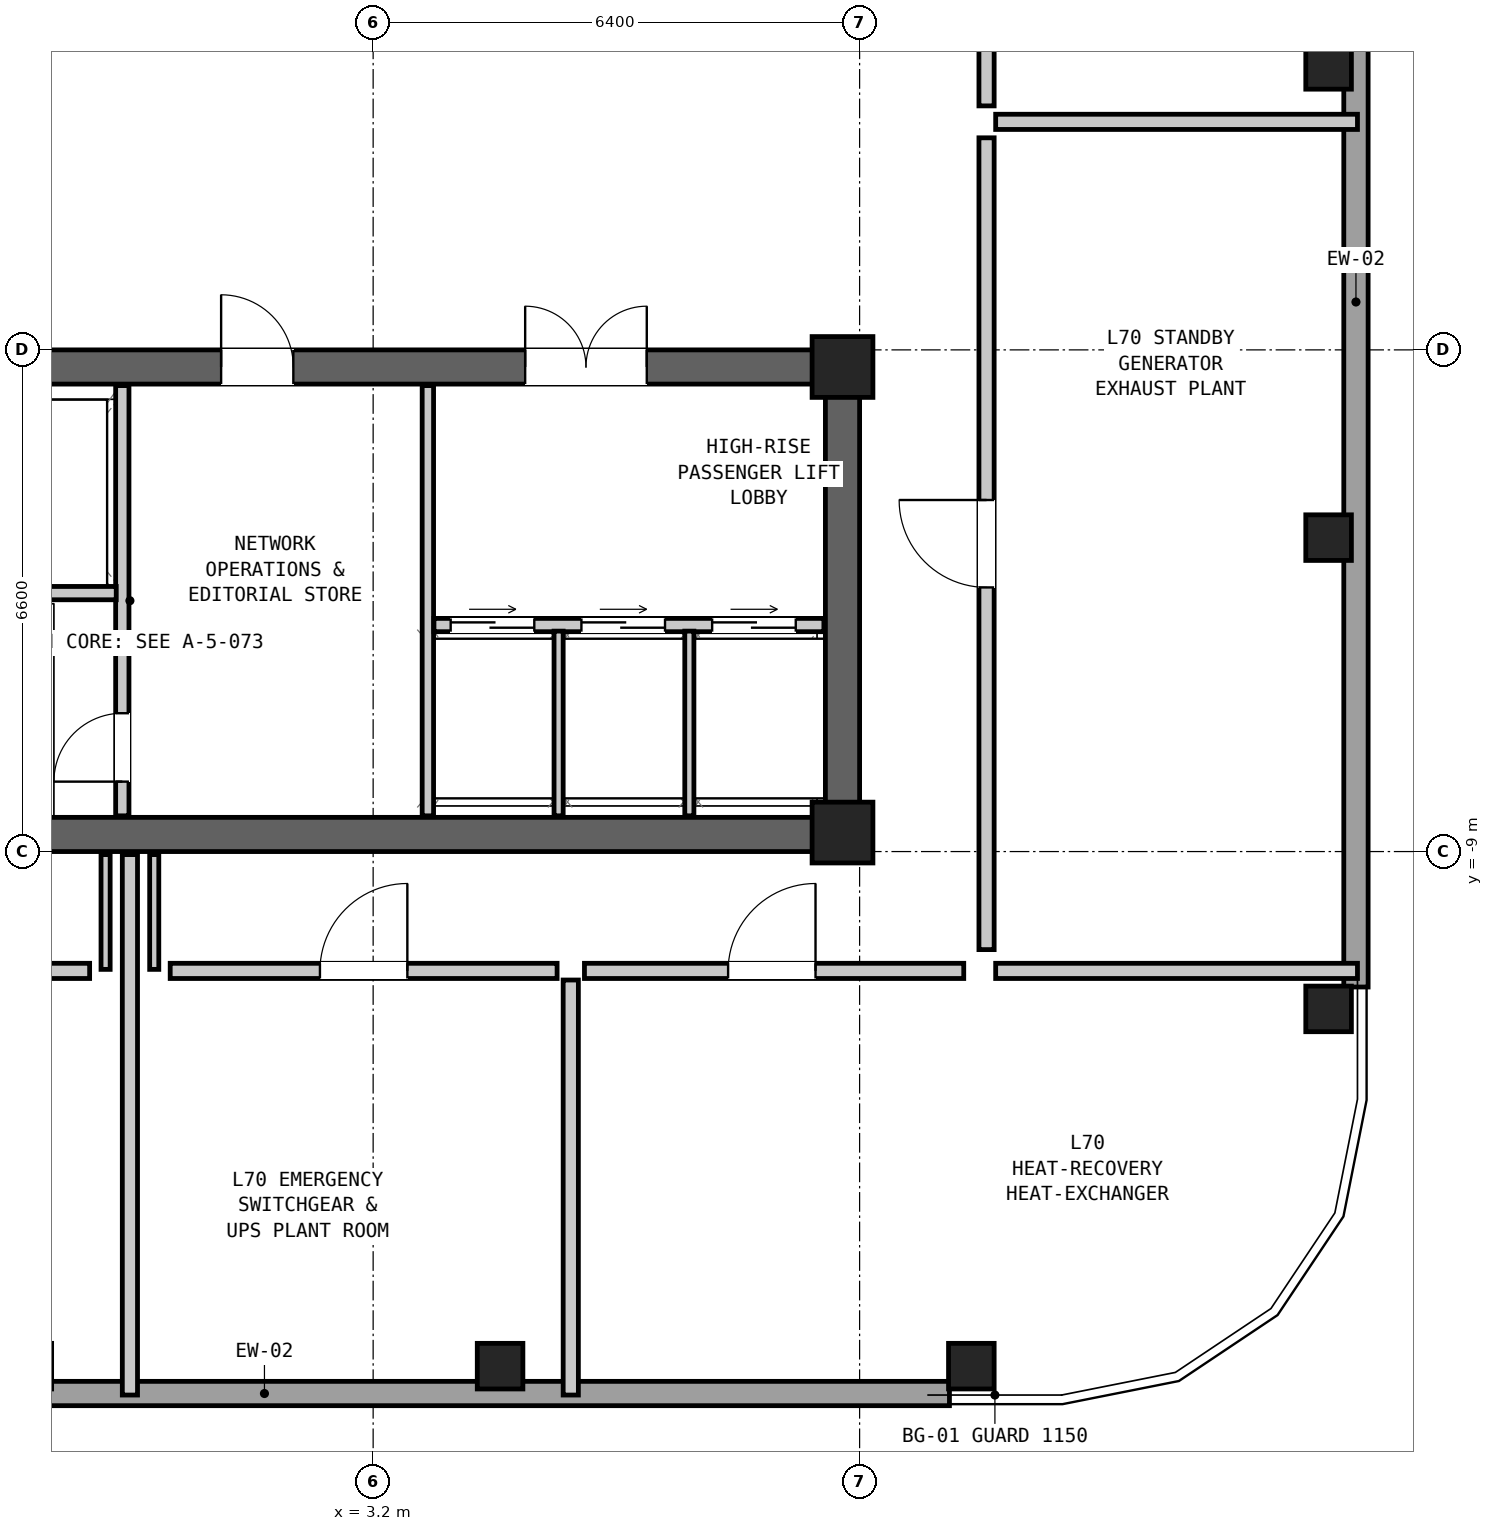
"""IFC4 building model, lengths in metres.
Left out: names, types, materials, properties, quantities, classifications, styles, units other than length and angle.
Written with IfcOpenShell. Run it as: python <this file> out.ifc"""

import sys

from ifc_helpers import new_model, si_unit, direction, frame, frame_2d, origin, origin_2d, place, context, subcontext, project, spatial, rectangle, hollow_rectangle, extrude, element, fill, save


model = new_model("IFC4")
c1 = context("Model", 3, precision=1e-05, world=origin(), true_north=direction((0.0, 1.0)))
c2 = subcontext(c1, "Body", "Model", "MODEL_VIEW")
j1 = project(units=[si_unit("LENGTHUNIT", "METRE"), si_unit("PLANEANGLEUNIT", "RADIAN")], contexts=[c1])
p1 = place(None, origin())
s1 = spatial("IfcSite", under=j1, at=p1, CompositionType="ELEMENT")
p2 = place(p1, origin())
s2 = spatial("IfcBuilding", under=s1, at=p2, CompositionType="ELEMENT")
p3 = place(p2, frame((0.0, 0.0, 238.5)))
s3 = spatial("IfcBuildingStorey", under=s2, at=p3, CompositionType="ELEMENT", Elevation=238.5)
p4 = place(p3, frame((-9.6, -8.775, 0.0), z_axis=(0.0, 0.0, 1.0), x_axis=(1.0, 0.0, 0.0)))
e1 = element("IfcWall", 1, at=p4, inside=s3, PredefinedType="SHEAR", context=c2, shape_type="SweptSolid", body=[
    extrude(rectangle(XDim=19.2, YDim=0.45, at=frame_2d((9.6, 0.0))), origin(), (0.0, 0.0, 1.0), 4.35),
])
p5 = place(p3, frame((-9.6, -2.625, 0.0), z_axis=(0.0, 0.0, 1.0), x_axis=(1.0, 0.0, 0.0)))
e2 = element("IfcWall", 2, at=p5, inside=s3, PredefinedType="SHEAR", context=c2, shape_type="SweptSolid", body=[
    extrude(rectangle(XDim=19.2, YDim=0.45, at=frame_2d((9.6, 0.0))), origin(), (0.0, 0.0, 1.0), 4.35),
])
p6 = place(p5, frame((3.8, 0.0, 0.0)))
e3 = element("IfcOpeningElement", 3, at=p6, cuts=e2, PredefinedType="OPENING", context=c2, shape_type="SweptSolid", body=[
    extrude(rectangle(XDim=1.1, YDim=2.08, at=frame_2d((0.55, 1.04))), frame((0.0, 0.237, 0.0), z_axis=(0.0, -1.0, 0.0), x_axis=(1.0, 0.0, 0.0)), (0.0, 0.0, 1.0), 0.474),
])
p7 = place(p5, frame((10.8, 0.0, 0.0)))
e4 = element("IfcOpeningElement", 4, at=p7, cuts=e2, PredefinedType="OPENING", context=c2, shape_type="SweptSolid", body=[
    extrude(rectangle(XDim=0.95, YDim=2.1, at=frame_2d((0.475, 1.05))), frame((0.0, 0.237, 0.0), z_axis=(0.0, -1.0, 0.0), x_axis=(1.0, 0.0, 0.0)), (0.0, 0.0, 1.0), 0.474),
])
p8 = place(p5, frame((14.8, 0.0, 0.0)))
e5 = element("IfcOpeningElement", 5, at=p8, cuts=e2, PredefinedType="OPENING", context=c2, shape_type="SweptSolid", body=[
    extrude(rectangle(XDim=1.6, YDim=2.12, at=frame_2d((0.8, 1.06))), frame((0.0, 0.237, 0.0), z_axis=(0.0, -1.0, 0.0), x_axis=(1.0, 0.0, 0.0)), (0.0, 0.0, 1.0), 0.474),
])
p9 = place(p3, frame((9.375, -9.0, 0.0), z_axis=(0.0, 0.0, 1.0), x_axis=(0.0, 1.0, 0.0)))
e6 = element("IfcWall", 6, at=p9, inside=s3, PredefinedType="SHEAR", context=c2, shape_type="SweptSolid", body=[
    extrude(rectangle(XDim=6.6, YDim=0.45, at=frame_2d((3.3, 0.0))), origin(), (0.0, 0.0, 1.0), 4.35),
])
for number, where, z_axis, x_axis in (
    (7, (4.87, -15.77, 0.0), (0.0, 0.0, 1.0), (1.0, 0.0, 0.0)),
    (8, (11.07, -15.77, 0.0), (0.0, 0.0, 1.0), (1.0, 0.0, 0.0)),
    (9, (15.77, -11.07, 0.0), (0.0, 0.0, 1.0), (0.0, 1.0, 0.0)),
    (10, (15.77, -4.87, 0.0), (0.0, 0.0, 1.0), (0.0, 1.0, 0.0)),
    (11, (15.77, 1.33, 0.0), (0.0, 0.0, 1.0), (0.0, 1.0, 0.0)),
):
    element("IfcColumn", number, at=place(p3, frame(where, z_axis=z_axis, x_axis=x_axis)), inside=s3, PredefinedType="COLUMN", context=c2, shape_type="SweptSolid", body=[
        extrude(hollow_rectangle(XDim=0.6, YDim=0.6, WallThickness=0.04, at=origin_2d()), origin(), (0.0, 0.0, 1.0), 4.35),
    ])
for number, where, z_axis, x_axis in (
    (12, (9.375, -2.625, 0.0), (0.0, 0.0, 1.0), (1.0, 0.0, 0.0)),
    (13, (9.375, -8.75, 0.0), (0.0, 0.0, 1.0), (1.0, 0.0, 0.0)),
):
    element("IfcColumn", number, at=place(p3, frame(where, z_axis=z_axis, x_axis=x_axis)), inside=s3, PredefinedType="COLUMN", context=c2, shape_type="SweptSolid", body=[
        extrude(rectangle(XDim=0.8, YDim=0.8, at=origin_2d()), origin(), (0.0, 0.0, 1.0), 4.35),
    ])
for number, where, z_axis, x_axis in (
    (14, (10.782, -16.13, 0.0), (0.0, 0.0, 1.0), (-1.0, 0.0, 0.0)),
    (15, (16.13, 7.242, 0.0), (0.0, 0.0, 1.0), (0.0, -1.0, 0.0)),
):
    element("IfcWall", number, at=place(p3, frame(where, z_axis=z_axis, x_axis=x_axis)), inside=s3, PredefinedType="SOLIDWALL", context=c2, shape_type="SweptSolid", body=[
        extrude(rectangle(XDim=18.024, YDim=0.32, at=frame_2d((9.012, 0.0))), origin(), (0.0, 0.0, 1.0), 2.34),
    ])
p10 = place(p3, frame((-0.1, -8.53, 0.0), z_axis=(0.0, 0.0, 1.0), x_axis=(0.0, 1.0, 0.0)))
e16 = element("IfcWall", 16, at=p10, inside=s3, PredefinedType="PARTITIONING", context=c2, shape_type="SweptSolid", body=[
    extrude(rectangle(XDim=5.66, YDim=0.175, at=frame_2d((2.83, 0.0))), origin(), (0.0, 0.0, 1.0), 2.34),
])
p11 = place(p10, frame((0.45, 0.0, 0.0)))
e17 = element("IfcOpeningElement", 17, at=p11, cuts=e16, PredefinedType="OPENING", context=c2, shape_type="SweptSolid", body=[
    extrude(rectangle(XDim=0.9, YDim=2.05, at=frame_2d((0.45, 1.025))), frame((0.0, 0.1, 0.0), z_axis=(0.0, -1.0, 0.0), x_axis=(1.0, 0.0, 0.0)), (0.0, 0.0, 1.0), 0.199),
])
p12 = place(p3, frame((-2.15, -5.6, 0.0), z_axis=(0.0, 0.0, 1.0), x_axis=(1.0, 0.0, 0.0)))
e18 = element("IfcWall", 18, at=p12, inside=s3, PredefinedType="PARTITIONING", context=c2, shape_type="SweptSolid", body=[
    extrude(rectangle(XDim=1.97, YDim=0.175, at=frame_2d((0.985, 0.0))), origin(), (0.0, 0.0, 1.0), 4.16),
])
p13 = place(p3, frame((3.92, -8.53, 0.0), z_axis=(0.0, 0.0, 1.0), x_axis=(0.0, 1.0, 0.0)))
e19 = element("IfcWall", 19, at=p13, inside=s3, PredefinedType="PARTITIONING", context=c2, shape_type="SweptSolid", body=[
    extrude(rectangle(XDim=5.66, YDim=0.15, at=frame_2d((2.83, 0.0))), origin(), (0.0, 0.0, 1.0), 2.34),
])
p14 = place(p3, frame((4.0, -6.02, 0.0), z_axis=(0.0, 0.0, 1.0), x_axis=(1.0, 0.0, 0.0)))
e20 = element("IfcWall", 20, at=p14, inside=s3, PredefinedType="PARTITIONING", context=c2, shape_type="SweptSolid", body=[
    extrude(rectangle(XDim=5.13, YDim=0.175, at=frame_2d((2.565, 0.0))), origin(), (0.0, 0.0, 1.0), 4.16),
])
p15 = place(p14, frame((0.22, 0.0, 0.0)))
e21 = element("IfcOpeningElement", 21, at=p15, cuts=e20, PredefinedType="OPENING", context=c2, shape_type="SweptSolid", body=[
    extrude(rectangle(XDim=1.1, YDim=2.06, at=frame_2d((0.55, 1.03))), frame((0.0, 0.1, 0.0), z_axis=(0.0, -1.0, 0.0), x_axis=(1.0, 0.0, 0.0)), (0.0, 0.0, 1.0), 0.199),
])
p16 = place(p14, frame((1.94, 0.0, 0.0)))
e22 = element("IfcOpeningElement", 22, at=p16, cuts=e20, PredefinedType="OPENING", context=c2, shape_type="SweptSolid", body=[
    extrude(rectangle(XDim=1.1, YDim=2.06, at=frame_2d((0.55, 1.03))), frame((0.0, 0.1, 0.0), z_axis=(0.0, -1.0, 0.0), x_axis=(1.0, 0.0, 0.0)), (0.0, 0.0, 1.0), 0.199),
])
p17 = place(p14, frame((3.66, 0.0, 0.0)))
e23 = element("IfcOpeningElement", 23, at=p17, cuts=e20, PredefinedType="OPENING", context=c2, shape_type="SweptSolid", body=[
    extrude(rectangle(XDim=1.1, YDim=2.06, at=frame_2d((0.55, 1.03))), frame((0.0, 0.1, 0.0), z_axis=(0.0, -1.0, 0.0), x_axis=(1.0, 0.0, 0.0)), (0.0, 0.0, 1.0), 0.199),
])
for number, where, z_axis, x_axis in (
    (24, (5.64, -8.53, 0.0), (0.0, 0.0, 1.0), (0.0, 1.0, 0.0)),
    (25, (7.36, -8.53, 0.0), (0.0, 0.0, 1.0), (0.0, 1.0, 0.0)),
):
    element("IfcWall", number, at=place(p3, frame(where, z_axis=z_axis, x_axis=x_axis)), inside=s3, PredefinedType="PARTITIONING", context=c2, shape_type="SweptSolid", body=[
        extrude(rectangle(XDim=2.43, YDim=0.12, at=frame_2d((1.215, 0.0))), origin(), (0.0, 0.0, 1.0), 4.16),
    ])
p18 = place(p3, frame((0.0, -16.15, 0.0), z_axis=(0.0, 0.0, 1.0), x_axis=(0.0, 1.0, 0.0)))
e26 = element("IfcWall", 26, at=p18, inside=s3, PredefinedType="PARTITIONING", context=c2, shape_type="SweptSolid", body=[
    extrude(rectangle(XDim=7.11, YDim=0.2, at=frame_2d((3.555, 0.0))), origin(), (0.0, 0.0, 1.0), 2.34),
])
p19 = place(p3, frame((-0.32, -10.55, 0.0), z_axis=(0.0, 0.0, 1.0), x_axis=(0.0, 1.0, 0.0)))
e27 = element("IfcWall", 27, at=p19, inside=s3, PredefinedType="PARTITIONING", context=c2, shape_type="SweptSolid", body=[
    extrude(rectangle(XDim=1.51, YDim=0.12, at=frame_2d((0.755, 0.0))), origin(), (0.0, 0.0, 1.0), 2.34),
])
p20 = place(p3, frame((0.32, -10.55, 0.0), z_axis=(0.0, 0.0, 1.0), x_axis=(0.0, 1.0, 0.0)))
e28 = element("IfcWall", 28, at=p20, inside=s3, PredefinedType="PARTITIONING", context=c2, shape_type="SweptSolid", body=[
    extrude(rectangle(XDim=1.51, YDim=0.12, at=frame_2d((0.755, 0.0))), origin(), (0.0, 0.0, 1.0), 4.16),
])
p21 = place(p3, frame((-5.62, -10.57, 0.0), z_axis=(0.0, 0.0, 1.0), x_axis=(1.0, 0.0, 0.0)))
e29 = element("IfcWall", 29, at=p21, inside=s3, PredefinedType="PARTITIONING", context=c2, shape_type="SweptSolid", body=[
    extrude(rectangle(XDim=5.09, YDim=0.2, at=frame_2d((2.545, 0.0))), origin(), (0.0, 0.0, 1.0), 4.16),
])
p22 = place(p21, frame((1.99, 0.0, 0.0)))
e30 = element("IfcOpeningElement", 30, at=p22, cuts=e29, PredefinedType="OPENING", context=c2, shape_type="SweptSolid", body=[
    extrude(rectangle(XDim=1.15, YDim=2.1, at=frame_2d((0.575, 1.05))), frame((0.0, 0.112, 0.0), z_axis=(0.0, -1.0, 0.0), x_axis=(1.0, 0.0, 0.0)), (0.0, 0.0, 1.0), 0.224),
])
p23 = place(p3, frame((0.53, -10.57, 0.0), z_axis=(0.0, 0.0, 1.0), x_axis=(1.0, 0.0, 0.0)))
e31 = element("IfcWall", 31, at=p23, inside=s3, PredefinedType="PARTITIONING", context=c2, shape_type="SweptSolid", body=[
    extrude(rectangle(XDim=5.09, YDim=0.2, at=frame_2d((2.545, 0.0))), origin(), (0.0, 0.0, 1.0), 4.16),
])
p24 = place(p23, frame((1.97, 0.0, 0.0)))
e32 = element("IfcOpeningElement", 32, at=p24, cuts=e31, PredefinedType="OPENING", context=c2, shape_type="SweptSolid", body=[
    extrude(rectangle(XDim=1.15, YDim=2.1, at=frame_2d((0.575, 1.05))), frame((0.0, 0.112, 0.0), z_axis=(0.0, -1.0, 0.0), x_axis=(1.0, 0.0, 0.0)), (0.0, 0.0, 1.0), 0.224),
])
p25 = place(p3, frame((5.8, -16.15, 0.0), z_axis=(0.0, 0.0, 1.0), x_axis=(0.0, 1.0, 0.0)))
e33 = element("IfcWall", 33, at=p25, inside=s3, PredefinedType="PARTITIONING", context=c2, shape_type="SweptSolid", body=[
    extrude(rectangle(XDim=5.46, YDim=0.2, at=frame_2d((2.73, 0.0))), origin(), (0.0, 0.0, 1.0), 3.681),
])
p26 = place(p3, frame((5.98, -10.57, 0.0), z_axis=(0.0, 0.0, 1.0), x_axis=(1.0, 0.0, 0.0)))
e34 = element("IfcWall", 34, at=p26, inside=s3, PredefinedType="PARTITIONING", context=c2, shape_type="SweptSolid", body=[
    extrude(rectangle(XDim=4.99, YDim=0.2, at=frame_2d((2.495, 0.0))), origin(), (0.0, 0.0, 1.0), 4.16),
])
p27 = place(p26, frame((1.89, 0.0, 0.0)))
e35 = element("IfcOpeningElement", 35, at=p27, cuts=e34, PredefinedType="OPENING", context=c2, shape_type="SweptSolid", body=[
    extrude(rectangle(XDim=1.15, YDim=2.1, at=frame_2d((0.575, 1.05))), frame((0.0, 0.112, 0.0), z_axis=(0.0, -1.0, 0.0), x_axis=(1.0, 0.0, 0.0)), (0.0, 0.0, 1.0), 0.224),
])
p28 = place(p3, frame((11.39, -10.57, 0.0), z_axis=(0.0, 0.0, 1.0), x_axis=(1.0, 0.0, 0.0)))
e36 = element("IfcWall", 36, at=p28, inside=s3, PredefinedType="PARTITIONING", context=c2, shape_type="SweptSolid", body=[
    extrude(rectangle(XDim=4.76, YDim=0.2, at=frame_2d((2.38, 0.0))), origin(), (0.0, 0.0, 1.0), 4.16),
])
p29 = place(p3, frame((11.39, 0.6, 0.0), z_axis=(0.0, 0.0, 1.0), x_axis=(1.0, 0.0, 0.0)))
e37 = element("IfcWall", 37, at=p29, inside=s3, PredefinedType="PARTITIONING", context=c2, shape_type="SweptSolid", body=[
    extrude(rectangle(XDim=4.76, YDim=0.2, at=frame_2d((2.38, 0.0))), origin(), (0.0, 0.0, 1.0), 2.34),
])
p30 = place(p3, frame((11.27, -10.29, 0.0), z_axis=(0.0, 0.0, 1.0), x_axis=(0.0, 1.0, 0.0)))
e38 = element("IfcWall", 38, at=p30, inside=s3, PredefinedType="PARTITIONING", context=c2, shape_type="SweptSolid", body=[
    extrude(rectangle(XDim=10.68, YDim=0.2, at=frame_2d((5.34, 0.0))), origin(), (0.0, 0.0, 1.0), 4.16),
])
p31 = place(p30, frame((4.765, 0.0, 0.0)))
e39 = element("IfcOpeningElement", 39, at=p31, cuts=e38, PredefinedType="OPENING", context=c2, shape_type="SweptSolid", body=[
    extrude(rectangle(XDim=1.15, YDim=2.1, at=frame_2d((0.575, 1.05))), frame((0.0, 0.112, 0.0), z_axis=(0.0, -1.0, 0.0), x_axis=(1.0, 0.0, 0.0)), (0.0, 0.0, 1.0), 0.224),
])
p32 = place(p3, frame((11.27, 0.81, 0.0), z_axis=(0.0, 0.0, 1.0), x_axis=(0.0, 1.0, 0.0)))
e40 = element("IfcWall", 40, at=p32, inside=s3, PredefinedType="PARTITIONING", context=c2, shape_type="SweptSolid", body=[
    extrude(rectangle(XDim=10.68, YDim=0.2, at=frame_2d((5.34, 0.0))), origin(), (0.0, 0.0, 1.0), 4.16),
])
p33 = place(p32, frame((6.047, 0.0, 0.0)))
e41 = element("IfcOpeningElement", 41, at=p33, cuts=e40, PredefinedType="OPENING", context=c2, shape_type="SweptSolid", body=[
    extrude(rectangle(XDim=1.15, YDim=2.1, at=frame_2d((0.575, 1.05))), frame((0.0, 0.112, 0.0), z_axis=(0.0, -1.0, 0.0), x_axis=(1.0, 0.0, 0.0)), (0.0, 0.0, 1.0), 0.224),
])
p34 = place(p11, origin())
e42 = element("IfcDoor", 42, at=p34, inside=s3, OperationType="SINGLE_SWING_LEFT", PredefinedType="DOOR", context=c2, shape_type="SweptSolid", body=[
    extrude(rectangle(XDim=0.9, YDim=2.05, at=frame_2d((0.45, 1.025))), frame((0.0, 0.025, 0.0), z_axis=(0.0, -1.0, 0.0), x_axis=(1.0, 0.0, 0.0)), (0.0, 0.0, 1.0), 0.05),
])
fill(e17, e42)
p35 = place(p7, origin())
e43 = element("IfcDoor", 43, at=p35, inside=s3, OperationType="SINGLE_SWING_LEFT", PredefinedType="DOOR", context=c2, shape_type="SweptSolid", body=[
    extrude(rectangle(XDim=0.95, YDim=2.1, at=frame_2d((0.475, 1.05))), frame((0.0, 0.025, 0.0), z_axis=(0.0, -1.0, 0.0), x_axis=(1.0, 0.0, 0.0)), (0.0, 0.0, 1.0), 0.05),
])
fill(e4, e43)
p36 = place(p15, origin())
e44 = element("IfcDoor", 44, at=p36, inside=s3, OperationType="DOUBLE_DOOR_SLIDING", PredefinedType="DOOR", context=c2, shape_type="SweptSolid", body=[
    extrude(rectangle(XDim=1.1, YDim=2.06, at=frame_2d((0.55, 1.03))), frame((0.0, 0.025, 0.0), z_axis=(0.0, -1.0, 0.0), x_axis=(1.0, 0.0, 0.0)), (0.0, 0.0, 1.0), 0.05),
])
fill(e21, e44)
p37 = place(p16, origin())
e45 = element("IfcDoor", 45, at=p37, inside=s3, OperationType="DOUBLE_DOOR_SLIDING", PredefinedType="DOOR", context=c2, shape_type="SweptSolid", body=[
    extrude(rectangle(XDim=1.1, YDim=2.06, at=frame_2d((0.55, 1.03))), frame((0.0, 0.025, 0.0), z_axis=(0.0, -1.0, 0.0), x_axis=(1.0, 0.0, 0.0)), (0.0, 0.0, 1.0), 0.05),
])
fill(e22, e45)
p38 = place(p17, origin())
e46 = element("IfcDoor", 46, at=p38, inside=s3, OperationType="DOUBLE_DOOR_SLIDING", PredefinedType="DOOR", context=c2, shape_type="SweptSolid", body=[
    extrude(rectangle(XDim=1.1, YDim=2.06, at=frame_2d((0.55, 1.03))), frame((0.0, 0.025, 0.0), z_axis=(0.0, -1.0, 0.0), x_axis=(1.0, 0.0, 0.0)), (0.0, 0.0, 1.0), 0.05),
])
fill(e23, e46)
p39 = place(p8, origin())
e47 = element("IfcDoor", 47, at=p39, inside=s3, OperationType="DOUBLE_DOOR_SINGLE_SWING", PredefinedType="DOOR", context=c2, shape_type="SweptSolid", body=[
    extrude(rectangle(XDim=1.6, YDim=2.12, at=frame_2d((0.8, 1.06))), frame((0.0, 0.025, 0.0), z_axis=(0.0, -1.0, 0.0), x_axis=(1.0, 0.0, 0.0)), (0.0, 0.0, 1.0), 0.05),
])
fill(e5, e47)
p40 = place(p24, origin())
e48 = element("IfcDoor", 48, at=p40, inside=s3, OperationType="SINGLE_SWING_RIGHT", PredefinedType="DOOR", context=c2, shape_type="SweptSolid", body=[
    extrude(rectangle(XDim=1.15, YDim=2.1, at=frame_2d((0.575, 1.05))), frame((0.0, 0.025, 0.0), z_axis=(0.0, -1.0, 0.0), x_axis=(1.0, 0.0, 0.0)), (0.0, 0.0, 1.0), 0.05),
])
fill(e32, e48)
p41 = place(p27, origin())
e49 = element("IfcDoor", 49, at=p41, inside=s3, OperationType="SINGLE_SWING_RIGHT", PredefinedType="DOOR", context=c2, shape_type="SweptSolid", body=[
    extrude(rectangle(XDim=1.15, YDim=2.1, at=frame_2d((0.575, 1.05))), frame((0.0, 0.025, 0.0), z_axis=(0.0, -1.0, 0.0), x_axis=(1.0, 0.0, 0.0)), (0.0, 0.0, 1.0), 0.05),
])
fill(e35, e49)
p42 = place(p31, origin())
e50 = element("IfcDoor", 50, at=p42, inside=s3, OperationType="SINGLE_SWING_RIGHT", PredefinedType="DOOR", context=c2, shape_type="SweptSolid", body=[
    extrude(rectangle(XDim=1.15, YDim=2.1, at=frame_2d((0.575, 1.05))), frame((0.0, 0.025, 0.0), z_axis=(0.0, -1.0, 0.0), x_axis=(1.0, 0.0, 0.0)), (0.0, 0.0, 1.0), 0.05),
])
fill(e39, e50)
save(model, sys.argv[1])
